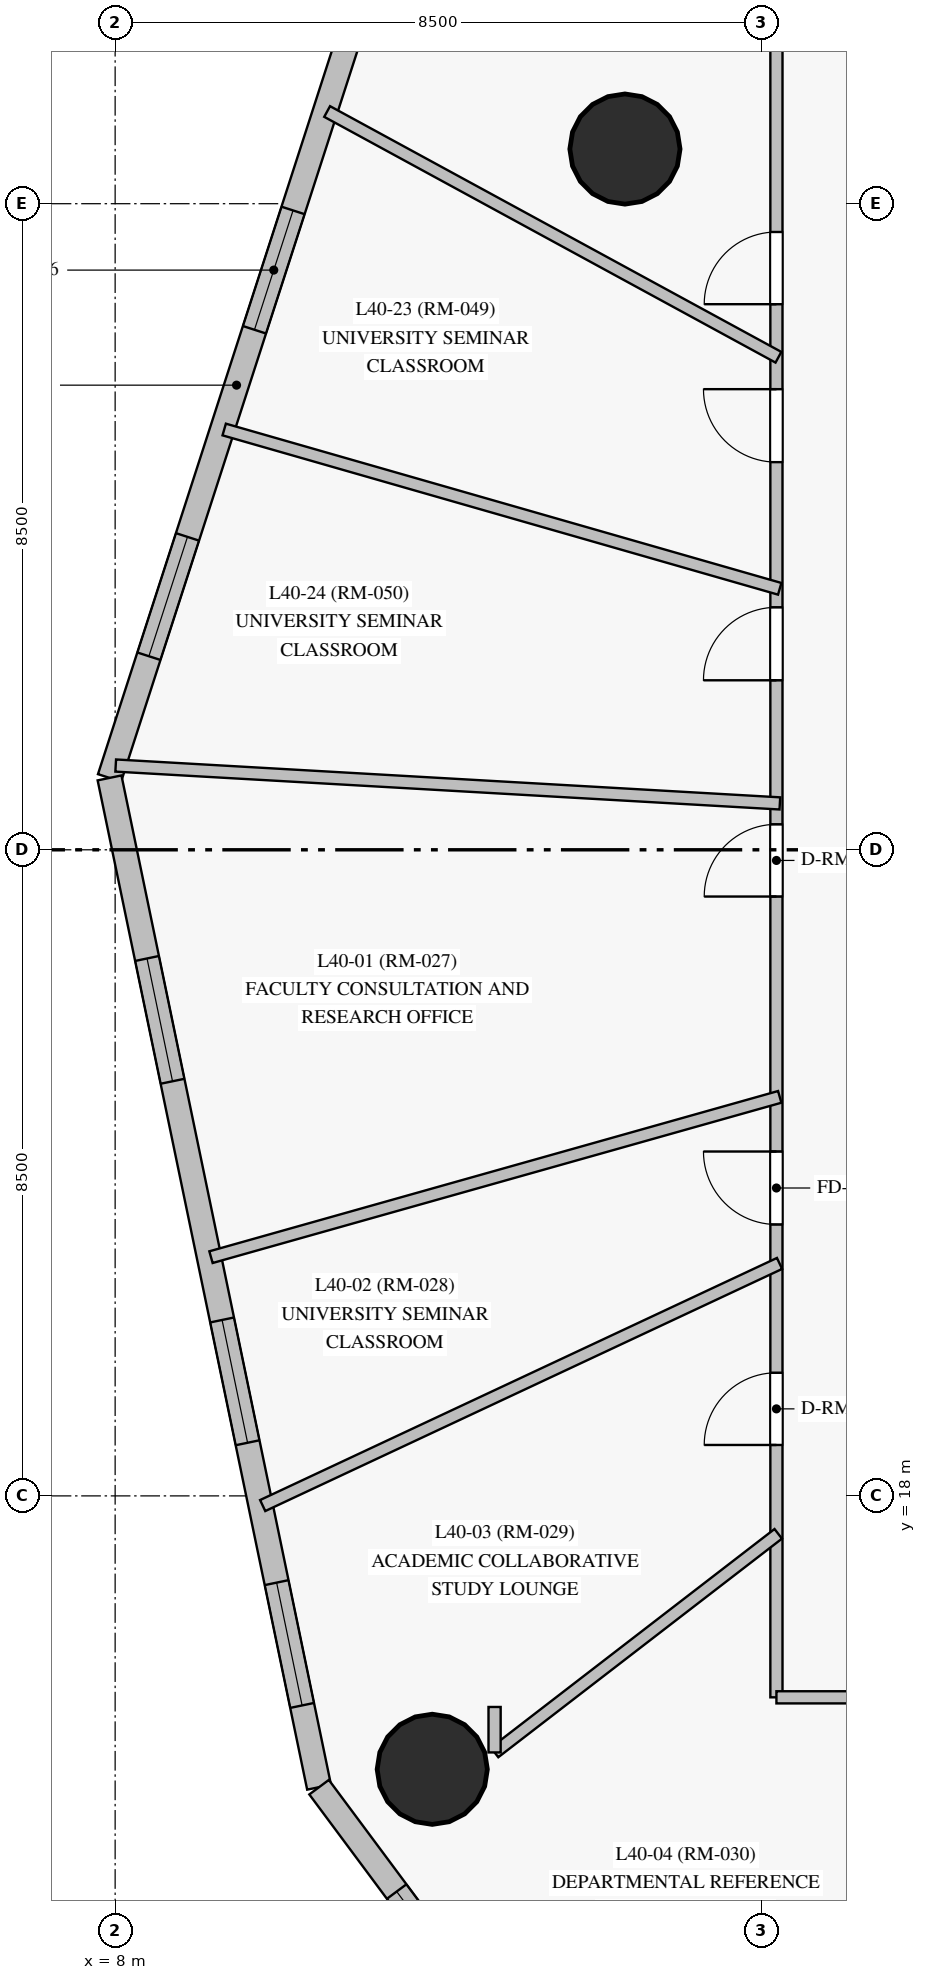
"""IFC4 building model, lengths in metres.
Left out: names, types, materials, properties, quantities, classifications, styles, units other than length and angle.
Written with IfcOpenShell. Run it as: python <this file> out.ifc"""

import sys

from ifc_helpers import new_model, si_unit, direction, frame, frame_2d, origin, origin_with_axes, origin_2d, place, context, subcontext, project, spatial, rectangle, circle, extrude, source, transform, mapped, element, fill, save


model = new_model("IFC4")
c1 = context("Model", 3, precision=1e-05, world=origin(), true_north=direction((0.0, 1.0)))
c2 = subcontext(c1, "Body", "Model", "MODEL_VIEW")
j1 = project(units=[si_unit("LENGTHUNIT", "METRE"), si_unit("PLANEANGLEUNIT", "RADIAN")], contexts=[c1])
p1 = place(None, origin())
s1 = spatial("IfcSite", under=j1, at=p1, CompositionType="ELEMENT")
p2 = place(p1, origin())
s2 = spatial("IfcBuilding", under=s1, at=p2, CompositionType="ELEMENT")
p3 = place(p2, frame((0.0, 0.0, 141.95)))
s3 = spatial("IfcBuildingStorey", under=s2, at=p3, CompositionType="ELEMENT", Elevation=141.95)
m1 = source(origin_with_axes(), c2, "Body", "SweptSolid", [
    extrude(circle(Radius=0.725, at=origin_2d()), origin(), (0.0, 0.0, 1.0), 3.05),
])
for number, where, z_axis, x_axis in (
    (1, (14.707, 35.719, 0.0), (0.0, 0.0, 1.0), (1.0, 0.0, 0.0)),
    (2, (12.172, 14.403, 0.0), (0.0, 0.0, 1.0), (1.0, 0.0, 0.0)),
):
    element("IfcColumn", number, at=place(p3, frame(where, z_axis=z_axis, x_axis=x_axis)), inside=s3, PredefinedType="COLUMN", context=c2, shape_type="MappedRepresentation", body=[
        mapped(m1, transform((0.0, 0.0, 0.0), scale=1.0)),
    ])
p4 = place(p3, frame((11.268, 37.78, 0.0), z_axis=(0.0, 0.0, 1.0), x_axis=(-0.307677236824, -0.951490787102, 0.0)))
e3 = element("IfcWall", 3, at=p4, inside=s3, PredefinedType="SOLIDWALL", context=c2, shape_type="SweptSolid", body=[
    extrude(rectangle(XDim=10.861, YDim=0.32, at=frame_2d((5.43, 0.0))), origin(), (0.0, 0.0, 1.0), 2.825),
])
p5 = place(p4, frame((3.014, 0.0, 0.85)))
e4 = element("IfcOpeningElement", 4, at=p5, cuts=e3, PredefinedType="OPENING", context=c2, shape_type="SweptSolid", body=[
    extrude(rectangle(XDim=1.65, YDim=1.65, at=frame_2d((0.825, 0.825))), frame((0.0, 0.17, 0.0), z_axis=(0.0, -1.0, 0.0), x_axis=(1.0, 0.0, 0.0)), (0.0, 0.0, 1.0), 0.34),
])
p6 = place(p4, frame((7.528, 0.0, 0.85)))
e5 = element("IfcOpeningElement", 5, at=p6, cuts=e3, PredefinedType="OPENING", context=c2, shape_type="SweptSolid", body=[
    extrude(rectangle(XDim=1.65, YDim=1.65, at=frame_2d((0.825, 0.825))), frame((0.0, 0.17, 0.0), z_axis=(0.0, -1.0, 0.0), x_axis=(1.0, 0.0, 0.0)), (0.0, 0.0, 1.0), 0.34),
])
p7 = place(p3, frame((7.927, 27.446, 0.0), z_axis=(0.0, 0.0, 1.0), x_axis=(0.203274097433, -0.979121872554, 0.0)))
e6 = element("IfcWall", 6, at=p7, inside=s3, PredefinedType="SOLIDWALL", context=c2, shape_type="SweptSolid", body=[
    extrude(rectangle(XDim=13.561, YDim=0.32, at=frame_2d((6.781, 0.0))), origin(), (0.0, 0.0, 1.0), 2.825),
])
p8 = place(p7, frame((2.426, 0.0, 0.85)))
e7 = element("IfcOpeningElement", 7, at=p8, cuts=e6, PredefinedType="OPENING", context=c2, shape_type="SweptSolid", body=[
    extrude(rectangle(XDim=1.65, YDim=1.65, at=frame_2d((0.825, 0.825))), frame((0.0, 0.17, 0.0), z_axis=(0.0, -1.0, 0.0), x_axis=(1.0, 0.0, 0.0)), (0.0, 0.0, 1.0), 0.34),
])
p9 = place(p7, frame((7.283, 0.0, 0.85)))
e8 = element("IfcOpeningElement", 8, at=p9, cuts=e6, PredefinedType="OPENING", context=c2, shape_type="SweptSolid", body=[
    extrude(rectangle(XDim=1.65, YDim=1.65, at=frame_2d((0.825, 0.825))), frame((0.0, 0.17, 0.0), z_axis=(0.0, -1.0, 0.0), x_axis=(1.0, 0.0, 0.0)), (0.0, 0.0, 1.0), 0.34),
])
p10 = place(p7, frame((10.813, 0.0, 0.85)))
e9 = element("IfcOpeningElement", 9, at=p10, cuts=e6, PredefinedType="OPENING", context=c2, shape_type="SweptSolid", body=[
    extrude(rectangle(XDim=1.65, YDim=1.65, at=frame_2d((0.825, 0.825))), frame((0.0, 0.17, 0.0), z_axis=(0.0, -1.0, 0.0), x_axis=(1.0, 0.0, 0.0)), (0.0, 0.0, 1.0), 0.34),
])
p11 = place(p3, frame((10.683, 14.168, 0.0), z_axis=(0.0, 0.0, 1.0), x_axis=(0.596714794235, -0.80245339699, 0.0)))
e10 = element("IfcWall", 10, at=p11, inside=s3, PredefinedType="SOLIDWALL", context=c2, shape_type="SweptSolid", body=[
    extrude(rectangle(XDim=9.384, YDim=0.32, at=frame_2d((4.692, 0.0))), origin(), (0.0, 0.0, 1.0), 2.825),
])
p12 = place(p11, frame((1.711, 0.0, 0.85)))
e11 = element("IfcOpeningElement", 11, at=p12, cuts=e10, PredefinedType="OPENING", context=c2, shape_type="SweptSolid", body=[
    extrude(rectangle(XDim=1.65, YDim=1.65, at=frame_2d((0.825, 0.825))), frame((0.0, 0.17, 0.0), z_axis=(0.0, -1.0, 0.0), x_axis=(1.0, 0.0, 0.0)), (0.0, 0.0, 1.0), 0.34),
])
p13 = place(p11, frame((6.023, 0.0, 0.85)))
e12 = element("IfcOpeningElement", 12, at=p13, cuts=e10, PredefinedType="OPENING", context=c2, shape_type="SweptSolid", body=[
    extrude(rectangle(XDim=1.65, YDim=1.65, at=frame_2d((0.825, 0.825))), frame((0.0, 0.17, 0.0), z_axis=(0.0, -1.0, 0.0), x_axis=(1.0, 0.0, 0.0)), (0.0, 0.0, 1.0), 0.34),
])
p14 = place(p3, frame((16.7, 15.35, 0.0), z_axis=(0.0, 0.0, 1.0), x_axis=(0.0, 1.0, 0.0)))
e13 = element("IfcWall", 13, at=p14, inside=s3, PredefinedType="PARTITIONING", context=c2, shape_type="SweptSolid", body=[
    extrude(rectangle(XDim=22.3, YDim=0.16, at=frame_2d((11.15, 0.0))), origin(), (0.0, 0.0, 1.0), 2.225),
])
p15 = place(p14, frame((10.535, 0.0, 0.0)))
e14 = element("IfcOpeningElement", 14, at=p15, cuts=e13, PredefinedType="OPENING", context=c2, shape_type="SweptSolid", body=[
    extrude(rectangle(XDim=0.95, YDim=2.15, at=frame_2d((0.475, 1.075))), frame((0.0, 0.09, 0.0), z_axis=(0.0, -1.0, 0.0), x_axis=(1.0, 0.0, 0.0)), (0.0, 0.0, 1.0), 0.18),
])
p16 = place(p14, frame((6.221, 0.0, 0.0)))
e15 = element("IfcOpeningElement", 15, at=p16, cuts=e13, PredefinedType="OPENING", context=c2, shape_type="SweptSolid", body=[
    extrude(rectangle(XDim=0.96, YDim=2.15, at=frame_2d((0.48, 1.075))), frame((0.0, 0.09, 0.0), z_axis=(0.0, -1.0, 0.0), x_axis=(1.0, 0.0, 0.0)), (0.0, 0.0, 1.0), 0.18),
])
p17 = place(p14, frame((3.32, 0.0, 0.0)))
e16 = element("IfcOpeningElement", 16, at=p17, cuts=e13, PredefinedType="OPENING", context=c2, shape_type="SweptSolid", body=[
    extrude(rectangle(XDim=0.95, YDim=2.15, at=frame_2d((0.475, 1.075))), frame((0.0, 0.09, 0.0), z_axis=(0.0, -1.0, 0.0), x_axis=(1.0, 0.0, 0.0)), (0.0, 0.0, 1.0), 0.18),
])
p18 = place(p14, frame((18.328, 0.0, 0.0)))
e17 = element("IfcOpeningElement", 17, at=p18, cuts=e13, PredefinedType="OPENING", context=c2, shape_type="SweptSolid", body=[
    extrude(rectangle(XDim=0.95, YDim=2.15, at=frame_2d((0.475, 1.075))), frame((0.0, 0.09, 0.0), z_axis=(0.0, -1.0, 0.0), x_axis=(1.0, 0.0, 0.0)), (0.0, 0.0, 1.0), 0.18),
])
p19 = place(p14, frame((16.25, 0.0, 0.0)))
e18 = element("IfcOpeningElement", 18, at=p19, cuts=e13, PredefinedType="OPENING", context=c2, shape_type="SweptSolid", body=[
    extrude(rectangle(XDim=0.96, YDim=2.15, at=frame_2d((0.48, 1.075))), frame((0.0, 0.09, 0.0), z_axis=(0.0, -1.0, 0.0), x_axis=(1.0, 0.0, 0.0)), (0.0, 0.0, 1.0), 0.18),
])
p20 = place(p14, frame((13.38, 0.0, 0.0)))
e19 = element("IfcOpeningElement", 19, at=p20, cuts=e13, PredefinedType="OPENING", context=c2, shape_type="SweptSolid", body=[
    extrude(rectangle(XDim=0.96, YDim=2.15, at=frame_2d((0.48, 1.075))), frame((0.0, 0.09, 0.0), z_axis=(0.0, -1.0, 0.0), x_axis=(1.0, 0.0, 0.0)), (0.0, 0.0, 1.0), 0.18),
])
p21 = place(p3, frame((27.55, 15.35, 0.0), z_axis=(0.0, 0.0, 1.0), x_axis=(-1.0, 0.0, 0.0)))
e20 = element("IfcWall", 20, at=p21, inside=s3, PredefinedType="PARTITIONING", context=c2, shape_type="SweptSolid", body=[
    extrude(rectangle(XDim=10.85, YDim=0.16, at=frame_2d((5.425, 0.0))), origin(), (0.0, 0.0, 1.0), 2.325),
])
p22 = place(p21, frame((7.167, 0.0, 0.0)))
e21 = element("IfcOpeningElement", 21, at=p22, cuts=e20, PredefinedType="OPENING", context=c2, shape_type="SweptSolid", body=[
    extrude(rectangle(XDim=0.95, YDim=2.15, at=frame_2d((0.475, 1.075))), frame((0.0, 0.09, 0.0), z_axis=(0.0, -1.0, 0.0), x_axis=(1.0, 0.0, 0.0)), (0.0, 0.0, 1.0), 0.18),
])
p23 = place(p21, frame((3.91, 0.0, 0.0)))
e22 = element("IfcOpeningElement", 22, at=p23, cuts=e20, PredefinedType="OPENING", context=c2, shape_type="SweptSolid", body=[
    extrude(rectangle(XDim=0.96, YDim=2.15, at=frame_2d((0.48, 1.075))), frame((0.0, 0.09, 0.0), z_axis=(0.0, -1.0, 0.0), x_axis=(1.0, 0.0, 0.0)), (0.0, 0.0, 1.0), 0.18),
])
p24 = place(p21, frame((1.883, 0.0, 0.0)))
e23 = element("IfcOpeningElement", 23, at=p24, cuts=e20, PredefinedType="OPENING", context=c2, shape_type="SweptSolid", body=[
    extrude(rectangle(XDim=0.96, YDim=2.15, at=frame_2d((0.48, 1.075))), frame((0.0, 0.09, 0.0), z_axis=(0.0, -1.0, 0.0), x_axis=(1.0, 0.0, 0.0)), (0.0, 0.0, 1.0), 0.18),
])
p25 = place(p21, frame((8.278, 0.0, 0.0)))
e24 = element("IfcOpeningElement", 24, at=p25, cuts=e20, PredefinedType="OPENING", context=c2, shape_type="SweptSolid", body=[
    extrude(rectangle(XDim=0.95, YDim=2.15, at=frame_2d((0.475, 1.075))), frame((0.0, 0.09, 0.0), z_axis=(0.0, -1.0, 0.0), x_axis=(1.0, 0.0, 0.0)), (0.0, 0.0, 1.0), 0.18),
])
p26 = place(p3, frame((22.433, 15.376, 0.0), z_axis=(0.0, 0.0, 1.0), x_axis=(-0.474668589789, -0.880164603849, 0.0)))
e25 = element("IfcWall", 25, at=p26, inside=s3, PredefinedType="PARTITIONING", context=c2, shape_type="SweptSolid", body=[
    extrude(rectangle(XDim=10.493, YDim=0.16, at=frame_2d((5.247, 0.0))), origin(), (0.0, 0.0, 1.0), 2.825),
])
p27 = place(p26, frame((4.816, 0.0, 0.0)))
e26 = element("IfcOpeningElement", 26, at=p27, cuts=e25, PredefinedType="OPENING", context=c2, shape_type="SweptSolid", body=[
    extrude(rectangle(XDim=0.86, YDim=2.04, at=frame_2d((0.43, 1.02))), frame((0.0, 0.09, 0.0), z_axis=(0.0, -1.0, 0.0), x_axis=(1.0, 0.0, 0.0)), (0.0, 0.0, 1.0), 0.18),
])
p28 = place(p3, frame((8.008, 27.608, 0.0), z_axis=(0.0, 0.0, 1.0), x_axis=(0.998377819676, -0.05693618514, 0.0)))
e27 = element("IfcWall", 27, at=p28, inside=s3, PredefinedType="PARTITIONING", context=c2, shape_type="SweptSolid", body=[
    extrude(rectangle(XDim=8.752, YDim=0.16, at=frame_2d((4.376, 0.0))), origin(), (0.0, 0.0, 1.0), 2.825),
])
p29 = place(p3, frame((21.024, 15.387, 0.0), z_axis=(0.0, 0.0, 1.0), x_axis=(-0.554453162651, -0.832214930427, 0.0)))
e28 = element("IfcWall", 28, at=p29, inside=s3, PredefinedType="PARTITIONING", context=c2, shape_type="SweptSolid", body=[
    extrude(rectangle(XDim=7.755, YDim=0.16, at=frame_2d((3.877, 0.0))), origin(), (0.0, 0.0, 1.0), 2.825),
])
p30 = place(p3, frame((16.743, 23.249, 0.0), z_axis=(0.0, 0.0, 1.0), x_axis=(-0.962509613296, -0.271247570152, 0.0)))
e29 = element("IfcWall", 29, at=p30, inside=s3, PredefinedType="PARTITIONING", context=c2, shape_type="SweptSolid", body=[
    extrude(rectangle(XDim=7.774, YDim=0.16, at=frame_2d((3.887, 0.0))), origin(), (0.0, 0.0, 1.0), 2.825),
])
p31 = place(p3, frame((16.743, 29.934, 0.0), z_axis=(0.0, 0.0, 1.0), x_axis=(-0.961259340158, 0.275645571268, 0.0)))
e30 = element("IfcWall", 30, at=p31, inside=s3, PredefinedType="PARTITIONING", context=c2, shape_type="SweptSolid", body=[
    extrude(rectangle(XDim=7.603, YDim=0.16, at=frame_2d((3.801, 0.0))), origin(), (0.0, 0.0, 1.0), 2.825),
])
p32 = place(p3, frame((16.741, 21.058, 0.0), z_axis=(0.0, 0.0, 1.0), x_axis=(-0.905560826744, -0.424216441296, 0.0)))
e31 = element("IfcWall", 31, at=p32, inside=s3, PredefinedType="PARTITIONING", context=c2, shape_type="SweptSolid", body=[
    extrude(rectangle(XDim=7.509, YDim=0.16, at=frame_2d((3.754, 0.0))), origin(), (0.0, 0.0, 1.0), 2.825),
])
p33 = place(p3, frame((16.726, 32.98, 0.0), z_axis=(0.0, 0.0, 1.0), x_axis=(-0.878227967227, 0.478242237345, 0.0)))
e32 = element("IfcWall", 32, at=p33, inside=s3, PredefinedType="PARTITIONING", context=c2, shape_type="SweptSolid", body=[
    extrude(rectangle(XDim=6.76, YDim=0.16, at=frame_2d((3.38, 0.0))), origin(), (0.0, 0.0, 1.0), 2.825),
])
p34 = place(p3, frame((16.724, 17.501, 0.0), z_axis=(0.0, 0.0, 1.0), x_axis=(-0.792109367108, -0.610379185867, 0.0)))
e33 = element("IfcWall", 33, at=p34, inside=s3, PredefinedType="PARTITIONING", context=c2, shape_type="SweptSolid", body=[
    extrude(rectangle(XDim=4.711, YDim=0.16, at=frame_2d((2.356, 0.0))), origin(), (0.0, 0.0, 1.0), 2.225),
])
p35 = place(p3, frame((12.992, 14.625, 0.0), z_axis=(0.0, 0.0, 1.0), x_axis=(0.0, 1.0, 0.0)))
e34 = element("IfcWall", 34, at=p35, inside=s3, PredefinedType="PARTITIONING", context=c2, shape_type="SweptSolid", body=[
    extrude(rectangle(XDim=0.598, YDim=0.16, at=frame_2d((0.299, 0.0))), origin(), (0.0, 0.0, 1.0), 2.825),
])
m2 = source(origin_with_axes(), c2, "Body", "SweptSolid", [
    extrude(rectangle(XDim=1.65, YDim=1.65, at=frame_2d((0.825, 0.825))), frame((0.0, 0.03, 0.0), z_axis=(0.0, -1.0, 0.0), x_axis=(1.0, 0.0, 0.0)), (0.0, 0.0, 1.0), 0.06),
])
p36 = place(p5, origin())
e35 = element("IfcWindow", 35, at=p36, inside=s3, PartitioningType="SINGLE_PANEL", PredefinedType="WINDOW", context=c2, shape_type="MappedRepresentation", body=[
    mapped(m2, transform((0.0, 0.0, 0.0), scale=1.0)),
])
fill(e4, e35)
p37 = place(p6, origin())
e36 = element("IfcWindow", 36, at=p37, inside=s3, PartitioningType="SINGLE_PANEL", PredefinedType="WINDOW", context=c2, shape_type="MappedRepresentation", body=[
    mapped(m2, transform((0.0, 0.0, 0.0), scale=1.0)),
])
fill(e5, e36)
p38 = place(p8, origin())
e37 = element("IfcWindow", 37, at=p38, inside=s3, PartitioningType="SINGLE_PANEL", PredefinedType="WINDOW", context=c2, shape_type="MappedRepresentation", body=[
    mapped(m2, transform((0.0, 0.0, 0.0), scale=1.0)),
])
fill(e7, e37)
p39 = place(p9, origin())
e38 = element("IfcWindow", 38, at=p39, inside=s3, PartitioningType="SINGLE_PANEL", PredefinedType="WINDOW", context=c2, shape_type="MappedRepresentation", body=[
    mapped(m2, transform((0.0, 0.0, 0.0), scale=1.0)),
])
fill(e8, e38)
p40 = place(p10, origin())
e39 = element("IfcWindow", 39, at=p40, inside=s3, PartitioningType="SINGLE_PANEL", PredefinedType="WINDOW", context=c2, shape_type="MappedRepresentation", body=[
    mapped(m2, transform((0.0, 0.0, 0.0), scale=1.0)),
])
fill(e9, e39)
p41 = place(p12, origin())
e40 = element("IfcWindow", 40, at=p41, inside=s3, PartitioningType="SINGLE_PANEL", PredefinedType="WINDOW", context=c2, shape_type="MappedRepresentation", body=[
    mapped(m2, transform((0.0, 0.0, 0.0), scale=1.0)),
])
fill(e11, e40)
m3 = source(origin_with_axes(), c2, "Body", "SweptSolid", [
    extrude(rectangle(XDim=0.95, YDim=2.15, at=frame_2d((0.475, 1.075))), frame((0.0, 0.025, 0.0), z_axis=(0.0, -1.0, 0.0), x_axis=(1.0, 0.0, 0.0)), (0.0, 0.0, 1.0), 0.05),
])
p42 = place(p15, origin())
e41 = element("IfcDoor", 41, at=p42, inside=s3, OperationType="SINGLE_SWING_LEFT", PredefinedType="DOOR", context=c2, shape_type="MappedRepresentation", body=[
    mapped(m3, transform((0.0, 0.0, 0.0), scale=1.0)),
])
fill(e14, e41)
m4 = source(origin_with_axes(), c2, "Body", "SweptSolid", [
    extrude(rectangle(XDim=0.96, YDim=2.15, at=frame_2d((0.48, 1.075))), frame((0.0, 0.025, 0.0), z_axis=(0.0, -1.0, 0.0), x_axis=(1.0, 0.0, 0.0)), (0.0, 0.0, 1.0), 0.05),
])
p43 = place(p16, origin())
e42 = element("IfcDoor", 42, at=p43, inside=s3, OperationType="SINGLE_SWING_RIGHT", PredefinedType="DOOR", context=c2, shape_type="MappedRepresentation", body=[
    mapped(m4, transform((0.0, 0.0, 0.0), scale=1.0)),
])
fill(e15, e42)
p44 = place(p17, origin())
e43 = element("IfcDoor", 43, at=p44, inside=s3, OperationType="SINGLE_SWING_LEFT", PredefinedType="DOOR", context=c2, shape_type="MappedRepresentation", body=[
    mapped(m3, transform((0.0, 0.0, 0.0), scale=1.0)),
])
fill(e16, e43)
p45 = place(p18, origin())
e44 = element("IfcDoor", 44, at=p45, inside=s3, OperationType="SINGLE_SWING_LEFT", PredefinedType="DOOR", context=c2, shape_type="MappedRepresentation", body=[
    mapped(m3, transform((0.0, 0.0, 0.0), scale=1.0)),
])
fill(e17, e44)
p46 = place(p19, origin())
e45 = element("IfcDoor", 45, at=p46, inside=s3, OperationType="SINGLE_SWING_RIGHT", PredefinedType="DOOR", context=c2, shape_type="MappedRepresentation", body=[
    mapped(m4, transform((0.0, 0.0, 0.0), scale=1.0)),
])
fill(e18, e45)
p47 = place(p20, origin())
e46 = element("IfcDoor", 46, at=p47, inside=s3, OperationType="SINGLE_SWING_LEFT", PredefinedType="DOOR", context=c2, shape_type="MappedRepresentation", body=[
    mapped(m4, transform((0.0, 0.0, 0.0), scale=1.0)),
])
fill(e19, e46)
save(model, sys.argv[1])
